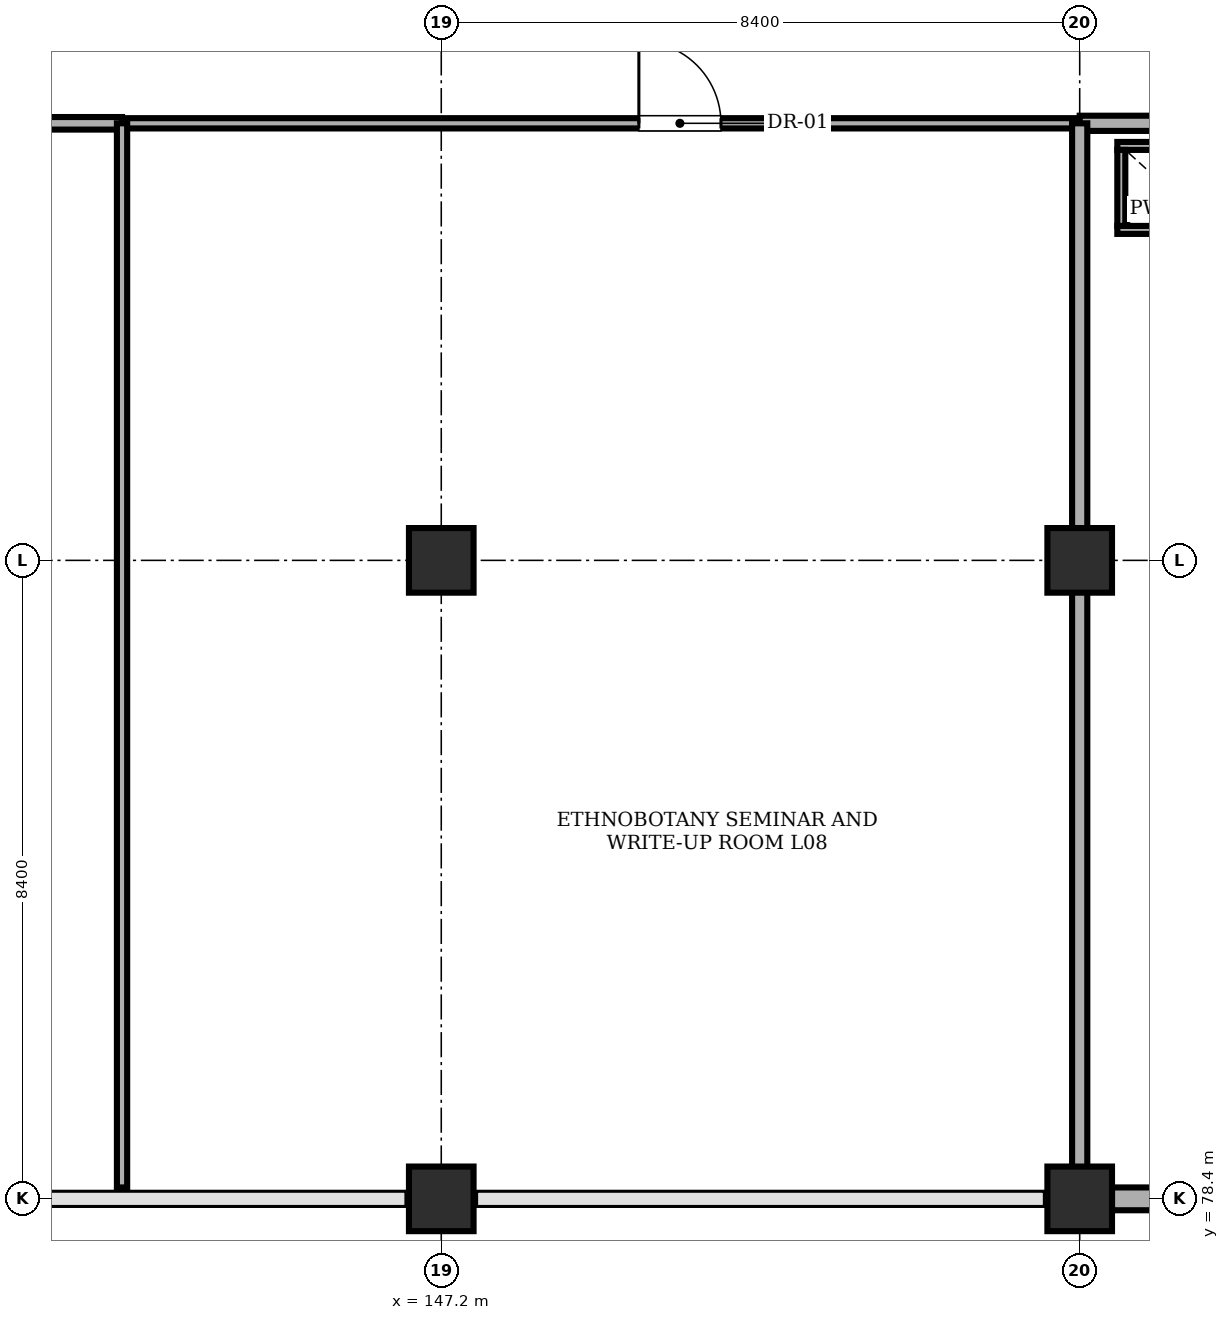
"""IFC4 building model, lengths in metres.
Left out: names, types, materials, properties, quantities, classifications, styles, units other than length and angle.
Written with IfcOpenShell. Run it as: python <this file> out.ifc"""

import sys

from ifc_helpers import new_model, si_unit, direction, frame, frame_2d, origin, origin_2d, place, context, subcontext, project, spatial, rectangle, extrude, element, fill, save


model = new_model("IFC4")
c1 = context("Model", 3, precision=1e-05, world=origin(), true_north=direction((0.0, 1.0)))
c2 = subcontext(c1, "Body", "Model", "MODEL_VIEW")
j1 = project(units=[si_unit("LENGTHUNIT", "METRE"), si_unit("PLANEANGLEUNIT", "RADIAN")], contexts=[c1])
p1 = place(None, origin())
s1 = spatial("IfcSite", under=j1, at=p1, CompositionType="ELEMENT")
p2 = place(p1, origin())
s2 = spatial("IfcBuilding", under=s1, at=p2, CompositionType="ELEMENT")
p3 = place(p2, frame((0.0, 0.0, 31.8)))
s3 = spatial("IfcBuildingStorey", under=s2, at=p3, CompositionType="ELEMENT", Elevation=31.8)
for number, where, z_axis, x_axis in (
    (1, (147.2, 78.4, 0.0), (0.0, 0.0, 1.0), (1.0, 0.0, 0.0)),
    (2, (147.2, 86.8, 0.0), (0.0, 0.0, 1.0), (1.0, 0.0, 0.0)),
    (3, (155.6, 78.4, 0.0), (0.0, 0.0, 1.0), (1.0, 0.0, 0.0)),
    (4, (155.6, 86.8, 0.0), (0.0, 0.0, 1.0), (1.0, 0.0, 0.0)),
):
    element("IfcColumn", number, at=place(p3, frame(where, z_axis=z_axis, x_axis=x_axis)), inside=s3, PredefinedType="COLUMN", context=c2, shape_type="SweptSolid", body=[
        extrude(rectangle(XDim=0.85, YDim=0.85, at=origin_2d()), origin(), (0.0, 0.0, 1.0), 4.02),
    ])
p4 = place(p3, frame((163.025, 78.4, 0.0), z_axis=(0.0, 0.0, 1.0), x_axis=(-1.0, 0.0, 0.0)))
e5 = element("IfcWall", 5, at=p4, inside=s3, PredefinedType="STANDARD", context=c2, shape_type="SweptSolid", body=[
    extrude(rectangle(XDim=7.0, YDim=0.3, at=frame_2d((3.5, 0.0))), origin(), (0.0, 0.0, 1.0), 3.32),
])
p5 = place(p4, frame((1.15, 0.0, 0.95)))
e6 = element("IfcOpeningElement", 6, at=p5, cuts=e5, PredefinedType="OPENING", context=c2, shape_type="SweptSolid", body=[
    extrude(rectangle(XDim=2.05, YDim=2.05, at=frame_2d((1.025, 1.025))), frame((0.0, 0.16, 0.0), z_axis=(0.0, -1.0, 0.0), x_axis=(1.0, 0.0, 0.0)), (0.0, 0.0, 1.0), 0.32),
])
p6 = place(p3, frame((130.55, 92.55, 0.0), z_axis=(0.0, 0.0, 1.0), x_axis=(1.0, 0.0, 0.0)))
e7 = element("IfcWall", 7, at=p6, inside=s3, PredefinedType="PARTITIONING", context=c2, shape_type="SweptSolid", body=[
    extrude(rectangle(XDim=12.45, YDim=0.165, at=frame_2d((6.225, 0.0))), origin(), (0.0, 0.0, 1.0), 4.02),
])
p7 = place(p6, frame((3.65, 0.0, 0.0)))
e8 = element("IfcOpeningElement", 8, at=p7, cuts=e7, PredefinedType="OPENING", context=c2, shape_type="SweptSolid", body=[
    extrude(rectangle(XDim=1.6, YDim=2.24, at=frame_2d((0.8, 1.12))), frame((0.0, 0.093, 0.0), z_axis=(0.0, -1.0, 0.0), x_axis=(1.0, 0.0, 0.0)), (0.0, 0.0, 1.0), 0.185),
])
p8 = place(p3, frame((143.0, 92.55, 0.0), z_axis=(0.0, 0.0, 1.0), x_axis=(1.0, 0.0, 0.0)))
e9 = element("IfcWall", 9, at=p8, inside=s3, PredefinedType="PARTITIONING", context=c2, shape_type="SweptSolid", body=[
    extrude(rectangle(XDim=12.6, YDim=0.135, at=frame_2d((6.3, 0.0))), origin(), (0.0, 0.0, 1.0), 4.02),
])
p9 = place(p8, frame((6.8, 0.0, 0.0)))
e10 = element("IfcOpeningElement", 10, at=p9, cuts=e9, PredefinedType="OPENING", context=c2, shape_type="SweptSolid", body=[
    extrude(rectangle(XDim=1.08, YDim=2.15, at=frame_2d((0.54, 1.075))), frame((0.0, 0.077, 0.0), z_axis=(0.0, -1.0, 0.0), x_axis=(1.0, 0.0, 0.0)), (0.0, 0.0, 1.0), 0.155),
])
p10 = place(p3, frame((143.0, 78.55, 0.0), z_axis=(0.0, 0.0, 1.0), x_axis=(0.0, 1.0, 0.0)))
e11 = element("IfcWall", 11, at=p10, inside=s3, PredefinedType="PARTITIONING", context=c2, shape_type="SweptSolid", body=[
    extrude(rectangle(XDim=14.0, YDim=0.135, at=frame_2d((7.0, 0.0))), origin(), (0.0, 0.0, 1.0), 3.52),
])
p11 = place(p3, frame((155.6, 92.55, 0.0), z_axis=(0.0, 0.0, 1.0), x_axis=(1.0, 0.0, 0.0)))
e12 = element("IfcWall", 12, at=p11, inside=s3, PredefinedType="SOLIDWALL", context=c2, shape_type="SweptSolid", body=[
    extrude(rectangle(XDim=7.75, YDim=0.2, at=frame_2d((3.875, 0.0))), origin(), (0.0, 0.0, 1.0), 4.02),
])
p12 = place(p11, frame((3.4, 0.0, 0.0)))
e13 = element("IfcOpeningElement", 13, at=p12, cuts=e12, PredefinedType="OPENING", context=c2, shape_type="SweptSolid", body=[
    extrude(rectangle(XDim=1.5, YDim=2.2, at=frame_2d((0.75, 1.1))), frame((0.0, 0.11, 0.0), z_axis=(0.0, -1.0, 0.0), x_axis=(1.0, 0.0, 0.0)), (0.0, 0.0, 1.0), 0.22),
])
p13 = place(p3, frame((155.6, 78.55, 0.0), z_axis=(0.0, 0.0, 1.0), x_axis=(0.0, 1.0, 0.0)))
e14 = element("IfcWall", 14, at=p13, inside=s3, PredefinedType="SOLIDWALL", context=c2, shape_type="SweptSolid", body=[
    extrude(rectangle(XDim=14.0, YDim=0.2, at=frame_2d((7.0, 0.0))), origin(), (0.0, 0.0, 1.0), 3.32),
])
for number, where, z_axis, x_axis in (
    (15, (156.095, 91.147, 0.0), (0.0, 0.0, 1.0), (1.0, 0.0, 0.0)),
    (16, (156.095, 92.252, 0.0), (0.0, 0.0, 1.0), (1.0, 0.0, 0.0)),
):
    element("IfcWall", number, at=place(p3, frame(where, z_axis=z_axis, x_axis=x_axis)), inside=s3, PredefinedType="PARTITIONING", context=c2, shape_type="SweptSolid", body=[
        extrude(rectangle(XDim=1.31, YDim=0.105, at=frame_2d((0.655, 0.0))), origin(), (0.0, 0.0, 1.0), 4.02),
    ])
p14 = place(p3, frame((156.147, 91.2, 0.0), z_axis=(0.0, 0.0, 1.0), x_axis=(0.0, 1.0, 0.0)))
e17 = element("IfcWall", 17, at=p14, inside=s3, PredefinedType="PARTITIONING", context=c2, shape_type="SweptSolid", body=[
    extrude(rectangle(XDim=1.0, YDim=0.105, at=frame_2d((0.5, 0.0))), origin(), (0.0, 0.0, 1.0), 4.02),
])
p15 = place(p9, origin())
e18 = element("IfcDoor", 18, at=p15, inside=s3, OperationType="SINGLE_SWING_LEFT", PredefinedType="DOOR", context=c2, shape_type="SweptSolid", body=[
    extrude(rectangle(XDim=1.08, YDim=2.15, at=frame_2d((0.54, 1.075))), frame((0.0, 0.025, 0.0), z_axis=(0.0, -1.0, 0.0), x_axis=(1.0, 0.0, 0.0)), (0.0, 0.0, 1.0), 0.05),
])
fill(e10, e18)
save(model, sys.argv[1])
